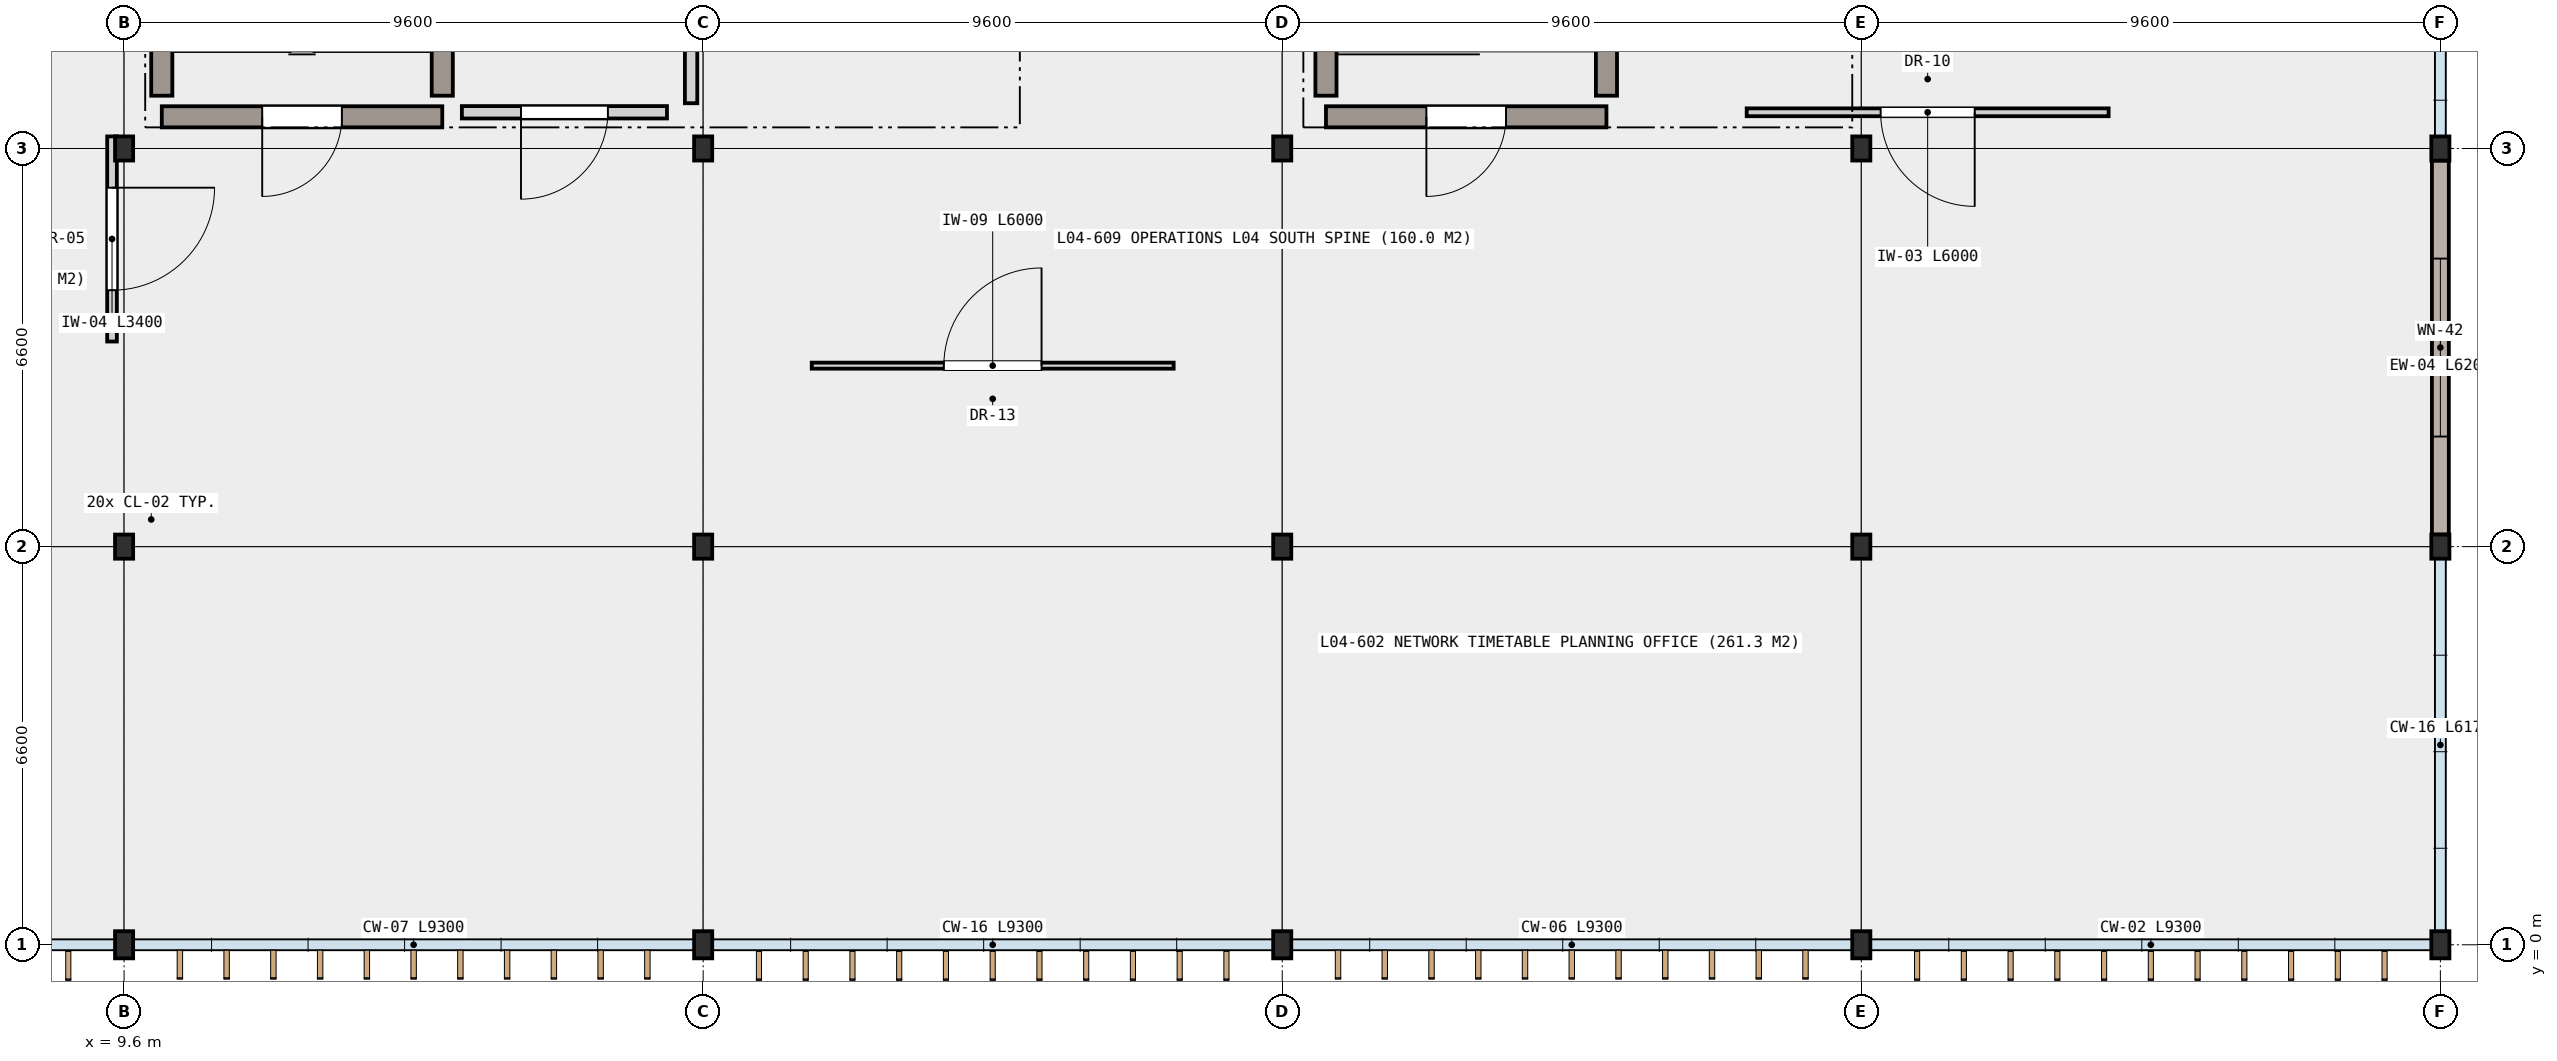
"""IFC4 building model, lengths in metres.
Left out: names, types, materials, properties, quantities, classifications, styles, units other than length and angle.
Written with IfcOpenShell. Run it as: python <this file> out.ifc"""

import sys

from ifc_helpers import new_model, si_unit, direction, frame, frame_2d, origin, origin_2d, place, context, subcontext, project, spatial, rectangle, i_section, extrude, element, fill, save


model = new_model("IFC4")
c1 = context("Model", 3, precision=1e-05, world=origin(), true_north=direction((0.0, 1.0)))
c2 = subcontext(c1, "Body", "Model", "MODEL_VIEW")
j1 = project(units=[si_unit("LENGTHUNIT", "METRE"), si_unit("PLANEANGLEUNIT", "RADIAN")], contexts=[c1])
p1 = place(None, origin())
s1 = spatial("IfcSite", under=j1, at=p1, CompositionType="ELEMENT")
p2 = place(p1, origin())
s2 = spatial("IfcBuilding", under=s1, at=p2, CompositionType="ELEMENT")
p3 = place(p2, frame((0.0, 0.0, 18.6)))
s3 = spatial("IfcBuildingStorey", under=s2, at=p3, CompositionType="ELEMENT", Elevation=18.6)
p4 = place(p3, frame((9.6, 0.0, 0.0), z_axis=(0.0, 0.0, 1.0), x_axis=(1.0, 0.0, 0.0)))
e1 = element("IfcColumn", 1, at=p4, inside=s3, PredefinedType="COLUMN", context=c2, shape_type="SweptSolid", body=[
    extrude(i_section(OverallWidth=0.3, OverallDepth=0.45, WebThickness=0.014, FlangeThickness=0.026, FilletRadius=0.027, at=origin_2d()), origin(), (0.0, 0.0, 1.0), 4.2),
])
for number, where, z_axis, x_axis in (
    (2, (9.6, 6.6, 0.0), (0.0, 0.0, 1.0), (1.0, 0.0, 0.0)),
    (3, (9.6, 13.2, 0.0), (0.0, 0.0, 1.0), (1.0, 0.0, 0.0)),
):
    element("IfcColumn", number, at=place(p3, frame(where, z_axis=z_axis, x_axis=x_axis)), inside=s3, PredefinedType="COLUMN", context=c2, shape_type="SweptSolid", body=[
        extrude(i_section(OverallWidth=0.3, OverallDepth=0.4, WebThickness=0.013, FlangeThickness=0.024, FilletRadius=0.027, at=origin_2d()), origin(), (0.0, 0.0, 1.0), 4.2),
    ])
p5 = place(p3, frame((19.2, 0.0, 0.0), z_axis=(0.0, 0.0, 1.0), x_axis=(1.0, 0.0, 0.0)))
e4 = element("IfcColumn", 4, at=p5, inside=s3, PredefinedType="COLUMN", context=c2, shape_type="SweptSolid", body=[
    extrude(i_section(OverallWidth=0.3, OverallDepth=0.45, WebThickness=0.014, FlangeThickness=0.026, FilletRadius=0.027, at=origin_2d()), origin(), (0.0, 0.0, 1.0), 4.2),
])
for number, where, z_axis, x_axis in (
    (5, (19.2, 6.6, 0.0), (0.0, 0.0, 1.0), (1.0, 0.0, 0.0)),
    (6, (19.2, 13.2, 0.0), (0.0, 0.0, 1.0), (1.0, 0.0, 0.0)),
):
    element("IfcColumn", number, at=place(p3, frame(where, z_axis=z_axis, x_axis=x_axis)), inside=s3, PredefinedType="COLUMN", context=c2, shape_type="SweptSolid", body=[
        extrude(i_section(OverallWidth=0.3, OverallDepth=0.4, WebThickness=0.013, FlangeThickness=0.024, FilletRadius=0.027, at=origin_2d()), origin(), (0.0, 0.0, 1.0), 4.2),
    ])
p6 = place(p3, frame((28.8, 0.0, 0.0), z_axis=(0.0, 0.0, 1.0), x_axis=(1.0, 0.0, 0.0)))
e7 = element("IfcColumn", 7, at=p6, inside=s3, PredefinedType="COLUMN", context=c2, shape_type="SweptSolid", body=[
    extrude(i_section(OverallWidth=0.3, OverallDepth=0.45, WebThickness=0.014, FlangeThickness=0.026, FilletRadius=0.027, at=origin_2d()), origin(), (0.0, 0.0, 1.0), 4.2),
])
for number, where, z_axis, x_axis in (
    (8, (28.8, 6.6, 0.0), (0.0, 0.0, 1.0), (1.0, 0.0, 0.0)),
    (9, (28.8, 13.2, 0.0), (0.0, 0.0, 1.0), (1.0, 0.0, 0.0)),
):
    element("IfcColumn", number, at=place(p3, frame(where, z_axis=z_axis, x_axis=x_axis)), inside=s3, PredefinedType="COLUMN", context=c2, shape_type="SweptSolid", body=[
        extrude(i_section(OverallWidth=0.3, OverallDepth=0.4, WebThickness=0.013, FlangeThickness=0.024, FilletRadius=0.027, at=origin_2d()), origin(), (0.0, 0.0, 1.0), 4.2),
    ])
p7 = place(p3, frame((38.4, 0.0, 0.0), z_axis=(0.0, 0.0, 1.0), x_axis=(1.0, 0.0, 0.0)))
e10 = element("IfcColumn", 10, at=p7, inside=s3, PredefinedType="COLUMN", context=c2, shape_type="SweptSolid", body=[
    extrude(i_section(OverallWidth=0.3, OverallDepth=0.45, WebThickness=0.014, FlangeThickness=0.026, FilletRadius=0.027, at=origin_2d()), origin(), (0.0, 0.0, 1.0), 4.2),
])
for number, where, z_axis, x_axis in (
    (11, (38.4, 6.6, 0.0), (0.0, 0.0, 1.0), (1.0, 0.0, 0.0)),
    (12, (38.4, 13.2, 0.0), (0.0, 0.0, 1.0), (1.0, 0.0, 0.0)),
):
    element("IfcColumn", number, at=place(p3, frame(where, z_axis=z_axis, x_axis=x_axis)), inside=s3, PredefinedType="COLUMN", context=c2, shape_type="SweptSolid", body=[
        extrude(i_section(OverallWidth=0.3, OverallDepth=0.4, WebThickness=0.013, FlangeThickness=0.024, FilletRadius=0.027, at=origin_2d()), origin(), (0.0, 0.0, 1.0), 4.2),
    ])
p8 = place(p3, frame((48.0, 0.0, 0.0), z_axis=(0.0, 0.0, 1.0), x_axis=(1.0, 0.0, 0.0)))
e13 = element("IfcColumn", 13, at=p8, inside=s3, PredefinedType="COLUMN", context=c2, shape_type="SweptSolid", body=[
    extrude(i_section(OverallWidth=0.3, OverallDepth=0.45, WebThickness=0.014, FlangeThickness=0.026, FilletRadius=0.027, at=origin_2d()), origin(), (0.0, 0.0, 1.0), 4.2),
])
for number, where, z_axis, x_axis in (
    (14, (48.0, 6.6, 0.0), (0.0, 0.0, 1.0), (1.0, 0.0, 0.0)),
    (15, (48.0, 13.2, 0.0), (0.0, 0.0, 1.0), (1.0, 0.0, 0.0)),
):
    element("IfcColumn", number, at=place(p3, frame(where, z_axis=z_axis, x_axis=x_axis)), inside=s3, PredefinedType="COLUMN", context=c2, shape_type="SweptSolid", body=[
        extrude(i_section(OverallWidth=0.3, OverallDepth=0.4, WebThickness=0.013, FlangeThickness=0.024, FilletRadius=0.027, at=origin_2d()), origin(), (0.0, 0.0, 1.0), 4.2),
    ])
p9 = place(p3, frame((48.0, 13.0, 0.0), z_axis=(0.0, 0.0, 1.0), x_axis=(0.0, -1.0, 0.0)))
e16 = element("IfcWall", 16, at=p9, inside=s3, PredefinedType="SOLIDWALL", context=c2, shape_type="SweptSolid", body=[
    extrude(rectangle(XDim=6.2, YDim=0.28, at=frame_2d((3.1, 0.0))), origin(), (0.0, 0.0, 1.0), 3.57),
])
p10 = place(p9, frame((1.625, 0.0, 0.85)))
e17 = element("IfcOpeningElement", 17, at=p10, cuts=e16, PredefinedType="OPENING", context=c2, shape_type="SweptSolid", body=[
    extrude(rectangle(XDim=2.95, YDim=1.85, at=frame_2d((1.475, 0.925))), frame((0.0, 0.15, 0.0), z_axis=(0.0, -1.0, 0.0), x_axis=(1.0, 0.0, 0.0)), (0.0, 0.0, 1.0), 0.3),
])
p11 = place(p3, frame((14.875, 13.725, 0.0), z_axis=(0.0, 0.0, 1.0), x_axis=(-1.0, 0.0, 0.0)))
e18 = element("IfcWall", 18, at=p11, inside=s3, PredefinedType="SHEAR", context=c2, shape_type="SweptSolid", body=[
    extrude(rectangle(XDim=4.65, YDim=0.35, at=frame_2d((2.325, 0.0))), origin(), (0.0, 0.0, 1.0), 3.96),
])
p12 = place(p11, frame((1.665, 0.0, 0.0)))
e19 = element("IfcOpeningElement", 19, at=p12, cuts=e18, PredefinedType="OPENING", context=c2, shape_type="SweptSolid", body=[
    extrude(rectangle(XDim=1.32, YDim=2.15, at=frame_2d((0.66, 1.075))), frame((0.0, 0.185, 0.0), z_axis=(0.0, -1.0, 0.0), x_axis=(1.0, 0.0, 0.0)), (0.0, 0.0, 1.0), 0.37),
])
for number, where, z_axis, x_axis in (
    (20, (10.225, 14.075, 0.0), (0.0, 0.0, 1.0), (0.0, 1.0, 0.0)),
    (21, (14.875, 21.125, 0.0), (0.0, 0.0, 1.0), (0.0, -1.0, 0.0)),
):
    element("IfcWall", number, at=place(p3, frame(where, z_axis=z_axis, x_axis=x_axis)), inside=s3, PredefinedType="SHEAR", context=c2, shape_type="SweptSolid", body=[
        extrude(rectangle(XDim=7.05, YDim=0.35, at=frame_2d((3.525, 0.0))), origin(), (0.0, 0.0, 1.0), 3.96),
    ])
p13 = place(p3, frame((34.175, 13.725, 0.0), z_axis=(0.0, 0.0, 1.0), x_axis=(-1.0, 0.0, 0.0)))
e22 = element("IfcWall", 22, at=p13, inside=s3, PredefinedType="SHEAR", context=c2, shape_type="SweptSolid", body=[
    extrude(rectangle(XDim=4.65, YDim=0.35, at=frame_2d((2.325, 0.0))), origin(), (0.0, 0.0, 1.0), 3.96),
])
p14 = place(p13, frame((1.665, 0.0, 0.0)))
e23 = element("IfcOpeningElement", 23, at=p14, cuts=e22, PredefinedType="OPENING", context=c2, shape_type="SweptSolid", body=[
    extrude(rectangle(XDim=1.32, YDim=2.15, at=frame_2d((0.66, 1.075))), frame((0.0, 0.185, 0.0), z_axis=(0.0, -1.0, 0.0), x_axis=(1.0, 0.0, 0.0)), (0.0, 0.0, 1.0), 0.37),
])
for number, where, z_axis, x_axis in (
    (24, (29.525, 14.075, 0.0), (0.0, 0.0, 1.0), (0.0, 1.0, 0.0)),
    (25, (34.175, 21.125, 0.0), (0.0, 0.0, 1.0), (0.0, -1.0, 0.0)),
):
    element("IfcWall", number, at=place(p3, frame(where, z_axis=z_axis, x_axis=x_axis)), inside=s3, PredefinedType="SHEAR", context=c2, shape_type="SweptSolid", body=[
        extrude(rectangle(XDim=7.05, YDim=0.35, at=frame_2d((3.525, 0.0))), origin(), (0.0, 0.0, 1.0), 3.96),
    ])
p15 = place(p3, frame((18.6, 13.8, 0.0), z_axis=(0.0, 0.0, 1.0), x_axis=(-1.0, 0.0, 0.0)))
e26 = element("IfcWall", 26, at=p15, inside=s3, PredefinedType="PARTITIONING", context=c2, shape_type="SweptSolid", body=[
    extrude(rectangle(XDim=3.4, YDim=0.205, at=frame_2d((1.7, 0.0))), origin(), (0.0, 0.0, 1.0), 3.96),
])
p16 = place(p15, frame((0.98, 0.0, 0.0)))
e27 = element("IfcOpeningElement", 27, at=p16, cuts=e26, PredefinedType="OPENING", context=c2, shape_type="SweptSolid", body=[
    extrude(rectangle(XDim=1.44, YDim=2.18, at=frame_2d((0.72, 1.09))), frame((0.0, 0.113, 0.0), z_axis=(0.0, -1.0, 0.0), x_axis=(1.0, 0.0, 0.0)), (0.0, 0.0, 1.0), 0.225),
])
p17 = place(p3, frame((19.0, 18.45, 0.0), z_axis=(0.0, 0.0, 1.0), x_axis=(0.0, -1.0, 0.0)))
e28 = element("IfcWall", 28, at=p17, inside=s3, PredefinedType="PARTITIONING", context=c2, shape_type="SweptSolid", body=[
    extrude(rectangle(XDim=4.5, YDim=0.205, at=frame_2d((2.25, 0.0))), origin(), (0.0, 0.0, 1.0), 3.38),
])
p18 = place(p3, frame((42.5, 13.8, 0.0), z_axis=(0.0, 0.0, 1.0), x_axis=(-1.0, 0.0, 0.0)))
e29 = element("IfcWall", 29, at=p18, inside=s3, PredefinedType="PARTITIONING", context=c2, shape_type="SweptSolid", body=[
    extrude(rectangle(XDim=6.0, YDim=0.13, at=frame_2d((3.0, 0.0))), origin(), (0.0, 0.0, 1.0), 3.96),
])
p19 = place(p18, frame((2.22, 0.0, 0.0)))
e30 = element("IfcOpeningElement", 30, at=p19, cuts=e29, PredefinedType="OPENING", context=c2, shape_type="SweptSolid", body=[
    extrude(rectangle(XDim=1.56, YDim=2.2, at=frame_2d((0.78, 1.1))), frame((0.0, 0.075, 0.0), z_axis=(0.0, -1.0, 0.0), x_axis=(1.0, 0.0, 0.0)), (0.0, 0.0, 1.0), 0.15),
])
p20 = place(p3, frame((21.0, 9.6, 0.0), z_axis=(0.0, 0.0, 1.0), x_axis=(1.0, 0.0, 0.0)))
e31 = element("IfcWall", 31, at=p20, inside=s3, PredefinedType="PARTITIONING", context=c2, shape_type="SweptSolid", body=[
    extrude(rectangle(XDim=6.0, YDim=0.1, at=frame_2d((3.0, 0.0))), origin(), (0.0, 0.0, 1.0), 3.96),
])
p21 = place(p20, frame((2.19, 0.0, 0.0)))
e32 = element("IfcOpeningElement", 32, at=p21, cuts=e31, PredefinedType="OPENING", context=c2, shape_type="SweptSolid", body=[
    extrude(rectangle(XDim=1.62, YDim=2.22, at=frame_2d((0.81, 1.11))), frame((0.0, 0.06, 0.0), z_axis=(0.0, -1.0, 0.0), x_axis=(1.0, 0.0, 0.0)), (0.0, 0.0, 1.0), 0.12),
])
p22 = place(p3, frame((9.4, 13.4, 0.0), z_axis=(0.0, 0.0, 1.0), x_axis=(0.0, -1.0, 0.0)))
e33 = element("IfcWall", 33, at=p22, inside=s3, PredefinedType="PARTITIONING", context=c2, shape_type="SweptSolid", body=[
    extrude(rectangle(XDim=3.4, YDim=0.16, at=frame_2d((1.7, 0.0))), origin(), (0.0, 0.0, 1.0), 3.43),
])
p23 = place(p22, frame((0.85, 0.0, 0.0)))
e34 = element("IfcOpeningElement", 34, at=p23, cuts=e33, PredefinedType="OPENING", context=c2, shape_type="SweptSolid", body=[
    extrude(rectangle(XDim=1.7, YDim=2.22, at=frame_2d((0.85, 1.11))), frame((0.0, 0.09, 0.0), z_axis=(0.0, -1.0, 0.0), x_axis=(1.0, 0.0, 0.0)), (0.0, 0.0, 1.0), 0.18),
])
p24 = place(p10, origin())
e35 = element("IfcWindow", 35, at=p24, inside=s3, PartitioningType="SINGLE_PANEL", PredefinedType="WINDOW", context=c2, shape_type="SweptSolid", body=[
    extrude(rectangle(XDim=2.95, YDim=1.85, at=frame_2d((1.475, 0.925))), frame((0.0, 0.03, 0.0), z_axis=(0.0, -1.0, 0.0), x_axis=(1.0, 0.0, 0.0)), (0.0, 0.0, 1.0), 0.06),
])
fill(e17, e35)
p25 = place(p12, origin())
e36 = element("IfcDoor", 36, at=p25, inside=s3, OperationType="SINGLE_SWING_RIGHT", PredefinedType="DOOR", context=c2, shape_type="SweptSolid", body=[
    extrude(rectangle(XDim=1.32, YDim=2.15, at=frame_2d((0.66, 1.075))), frame((0.0, 0.025, 0.0), z_axis=(0.0, -1.0, 0.0), x_axis=(1.0, 0.0, 0.0)), (0.0, 0.0, 1.0), 0.05),
])
fill(e19, e36)
p26 = place(p14, origin())
e37 = element("IfcDoor", 37, at=p26, inside=s3, OperationType="SINGLE_SWING_RIGHT", PredefinedType="DOOR", context=c2, shape_type="SweptSolid", body=[
    extrude(rectangle(XDim=1.32, YDim=2.15, at=frame_2d((0.66, 1.075))), frame((0.0, 0.025, 0.0), z_axis=(0.0, -1.0, 0.0), x_axis=(1.0, 0.0, 0.0)), (0.0, 0.0, 1.0), 0.05),
])
fill(e23, e37)
p27 = place(p16, origin())
e38 = element("IfcDoor", 38, at=p27, inside=s3, OperationType="SINGLE_SWING_RIGHT", PredefinedType="DOOR", context=c2, shape_type="SweptSolid", body=[
    extrude(rectangle(XDim=1.44, YDim=2.18, at=frame_2d((0.72, 1.09))), frame((0.0, 0.025, 0.0), z_axis=(0.0, -1.0, 0.0), x_axis=(1.0, 0.0, 0.0)), (0.0, 0.0, 1.0), 0.05),
])
fill(e27, e38)
p28 = place(p19, origin())
e39 = element("IfcDoor", 39, at=p28, inside=s3, OperationType="SINGLE_SWING_LEFT", PredefinedType="DOOR", context=c2, shape_type="SweptSolid", body=[
    extrude(rectangle(XDim=1.56, YDim=2.2, at=frame_2d((0.78, 1.1))), frame((0.0, 0.025, 0.0), z_axis=(0.0, -1.0, 0.0), x_axis=(1.0, 0.0, 0.0)), (0.0, 0.0, 1.0), 0.05),
])
fill(e30, e39)
p29 = place(p21, origin())
e40 = element("IfcDoor", 40, at=p29, inside=s3, OperationType="SINGLE_SWING_RIGHT", PredefinedType="DOOR", context=c2, shape_type="SweptSolid", body=[
    extrude(rectangle(XDim=1.62, YDim=2.22, at=frame_2d((0.81, 1.11))), frame((0.0, 0.025, 0.0), z_axis=(0.0, -1.0, 0.0), x_axis=(1.0, 0.0, 0.0)), (0.0, 0.0, 1.0), 0.05),
])
fill(e32, e40)
p30 = place(p23, origin())
e41 = element("IfcDoor", 41, at=p30, inside=s3, OperationType="SINGLE_SWING_LEFT", PredefinedType="DOOR", context=c2, shape_type="SweptSolid", body=[
    extrude(rectangle(XDim=1.7, YDim=2.22, at=frame_2d((0.85, 1.11))), frame((0.0, 0.025, 0.0), z_axis=(0.0, -1.0, 0.0), x_axis=(1.0, 0.0, 0.0)), (0.0, 0.0, 1.0), 0.05),
])
fill(e34, e41)
save(model, sys.argv[1])
